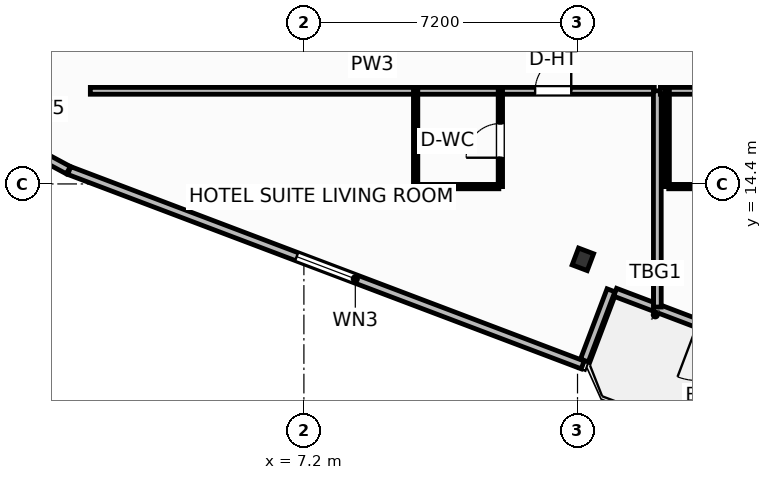
"""IFC4 building model, lengths in metres.
Left out: names, types, materials, properties, quantities, classifications, styles, units other than length and angle.
Written with IfcOpenShell. Run it as: python <this file> out.ifc"""

import sys

from ifc_helpers import new_model, si_unit, direction, frame, frame_2d, origin, origin_2d, place, context, subcontext, project, spatial, rectangle, i_section, extrude, element, fill, save


model = new_model("IFC4")
c1 = context("Model", 3, precision=1e-05, world=origin(), true_north=direction((0.0, 1.0)))
c2 = subcontext(c1, "Body", "Model", "MODEL_VIEW")
j1 = project(units=[si_unit("LENGTHUNIT", "METRE"), si_unit("PLANEANGLEUNIT", "RADIAN")], contexts=[c1])
p1 = place(None, origin())
s1 = spatial("IfcSite", under=j1, at=p1, CompositionType="ELEMENT")
p2 = place(p1, origin())
s2 = spatial("IfcBuilding", under=s1, at=p2, CompositionType="ELEMENT")
p3 = place(p2, frame((0.0, 0.0, 76.2)))
s3 = spatial("IfcBuildingStorey", under=s2, at=p3, CompositionType="ELEMENT", Elevation=76.2)
p4 = place(p3, frame((14.541, 12.416, 0.0), z_axis=(0.0, 0.0, 1.0), x_axis=(0.935221751401, -0.354062530786, 0.0)))
e1 = element("IfcColumn", 1, at=p4, inside=s3, PredefinedType="COLUMN", context=c2, shape_type="SweptSolid", body=[
    extrude(i_section(OverallWidth=0.424, OverallDepth=0.474, WebThickness=0.048, FlangeThickness=0.077, FilletRadius=0.025, at=origin_2d()), origin(), (0.0, 0.0, 1.0), 3.7),
])
p5 = place(p3, frame((21.0, 9.425, 0.0), z_axis=(0.0, 0.0, 1.0), x_axis=(-0.93521416643, 0.354082565101, 0.0)))
e2 = element("IfcWall", 2, at=p5, inside=s3, PredefinedType="SOLIDWALL", context=c2, shape_type="SweptSolid", body=[
    extrude(rectangle(XDim=6.0, YDim=0.22, at=frame_2d((3.0, 0.0))), origin(), (0.0, 0.0, 1.0), 2.73),
])
p6 = place(p5, frame((2.176, 0.0, 0.0)))
e3 = element("IfcOpeningElement", 3, at=p6, cuts=e2, PredefinedType="OPENING", context=c2, shape_type="SweptSolid", body=[
    extrude(rectangle(XDim=1.5, YDim=2.25, at=frame_2d((0.75, 1.125))), frame((0.0, 0.12, 0.0), z_axis=(0.0, -1.0, 0.0), x_axis=(1.0, 0.0, 0.0)), (0.0, 0.0, 1.0), 0.24),
])
p7 = place(p3, frame((-0.197, 15.406, 0.0), z_axis=(0.0, 0.0, 1.0), x_axis=(0.881023507585, -0.47307248819, 0.0)))
e4 = element("IfcWall", 4, at=p7, inside=s3, PredefinedType="SOLIDWALL", context=c2, shape_type="SweptSolid", body=[
    extrude(rectangle(XDim=1.361, YDim=0.22, at=frame_2d((0.68, 0.0))), origin(), (0.0, 0.0, 1.0), 2.73),
])
p8 = place(p3, frame((1.026, 14.753, 0.0), z_axis=(0.0, 0.0, 1.0), x_axis=(0.935222448475, -0.354060689526, 0.0)))
e5 = element("IfcWall", 5, at=p8, inside=s3, PredefinedType="SOLIDWALL", context=c2, shape_type="SweptSolid", body=[
    extrude(rectangle(XDim=14.447, YDim=0.22, at=frame_2d((7.224, 0.0))), origin(), (0.0, 0.0, 1.0), 2.73),
])
p9 = place(p8, frame((6.399, 0.0, 0.8)))
e6 = element("IfcOpeningElement", 6, at=p9, cuts=e5, PredefinedType="OPENING", context=c2, shape_type="SweptSolid", body=[
    extrude(rectangle(XDim=1.65, YDim=1.65, at=frame_2d((0.825, 0.825))), frame((0.0, 0.12, 0.0), z_axis=(0.0, -1.0, 0.0), x_axis=(1.0, 0.0, 0.0)), (0.0, 0.0, 1.0), 0.24),
])
p10 = place(p3, frame((14.581, 9.755, 0.0), z_axis=(0.0, 0.0, 1.0), x_axis=(0.354061611705, 0.935222099352, 0.0)))
e7 = element("IfcWall", 7, at=p10, inside=s3, PredefinedType="SOLIDWALL", context=c2, shape_type="SweptSolid", body=[
    extrude(rectangle(XDim=1.975, YDim=0.22, at=frame_2d((0.987, 0.0))), origin(), (0.0, 0.0, 1.0), 2.73),
])
p11 = place(p3, frame((1.58, 16.85, 0.0), z_axis=(0.0, 0.0, 1.0), x_axis=(1.0, 0.0, 0.0)))
e8 = element("IfcWall", 8, at=p11, inside=s3, PredefinedType="PARTITIONING", context=c2, shape_type="SweptSolid", body=[
    extrude(rectangle(XDim=14.84, YDim=0.18, at=frame_2d((7.42, 0.0))), origin(), (0.0, 0.0, 1.0), 3.45),
])
p12 = place(p11, frame((11.705, 0.0, 0.0)))
e9 = element("IfcOpeningElement", 9, at=p12, cuts=e8, PredefinedType="OPENING", context=c2, shape_type="SweptSolid", body=[
    extrude(rectangle(XDim=0.95, YDim=2.15, at=frame_2d((0.475, 1.075))), frame((0.0, 0.1, 0.0), z_axis=(0.0, -1.0, 0.0), x_axis=(1.0, 0.0, 0.0)), (0.0, 0.0, 1.0), 0.2),
])
p13 = place(p3, frame((10.18, 14.33, 0.0), z_axis=(0.0, 0.0, 1.0), x_axis=(1.0, 0.0, 0.0)))
e10 = element("IfcWall", 10, at=p13, inside=s3, PredefinedType="PARTITIONING", context=c2, shape_type="SweptSolid", body=[
    extrude(rectangle(XDim=2.15, YDim=0.115, at=frame_2d((1.075, 0.0))), origin(), (0.0, 0.0, 1.0), 3.45),
])
p14 = place(p3, frame((12.37, 14.33, 0.0), z_axis=(0.0, 0.0, 1.0), x_axis=(0.0, 1.0, 0.0)))
e11 = element("IfcWall", 11, at=p14, inside=s3, PredefinedType="PARTITIONING", context=c2, shape_type="SweptSolid", body=[
    extrude(rectangle(XDim=2.52, YDim=0.115, at=frame_2d((1.26, 0.0))), origin(), (0.0, 0.0, 1.0), 3.45),
])
p15 = place(p14, frame((0.76, 0.0, 0.0)))
e12 = element("IfcOpeningElement", 12, at=p15, cuts=e11, PredefinedType="OPENING", context=c2, shape_type="SweptSolid", body=[
    extrude(rectangle(XDim=0.9, YDim=2.05, at=frame_2d((0.45, 1.025))), frame((0.0, 0.067, 0.0), z_axis=(0.0, -1.0, 0.0), x_axis=(1.0, 0.0, 0.0)), (0.0, 0.0, 1.0), 0.135),
])
p16 = place(p3, frame((10.14, 14.33, 0.0), z_axis=(0.0, 0.0, 1.0), x_axis=(0.0, 1.0, 0.0)))
e13 = element("IfcWall", 13, at=p16, inside=s3, PredefinedType="PARTITIONING", context=c2, shape_type="SweptSolid", body=[
    extrude(rectangle(XDim=2.52, YDim=0.115, at=frame_2d((1.26, 0.0))), origin(), (0.0, 0.0, 1.0), 3.45),
])
p17 = place(p3, frame((16.5, 11.161, 0.0), z_axis=(0.0, 0.0, 1.0), x_axis=(0.0, 1.0, 0.0)))
e14 = element("IfcWall", 14, at=p17, inside=s3, PredefinedType="PARTITIONING", context=c2, shape_type="SweptSolid", body=[
    extrude(rectangle(XDim=5.689, YDim=0.205, at=frame_2d((2.844, 0.0))), origin(), (0.0, 0.0, 1.0), 3.45),
])
p18 = place(p3, frame((16.58, 16.85, 0.0), z_axis=(0.0, 0.0, 1.0), x_axis=(1.0, 0.0, 0.0)))
e15 = element("IfcWall", 15, at=p18, inside=s3, PredefinedType="PARTITIONING", context=c2, shape_type="SweptSolid", body=[
    extrude(rectangle(XDim=8.84, YDim=0.18, at=frame_2d((4.42, 0.0))), origin(), (0.0, 0.0, 1.0), 3.45),
])
p19 = place(p18, frame((3.23, 0.0, 0.0)))
e16 = element("IfcOpeningElement", 16, at=p19, cuts=e15, PredefinedType="OPENING", context=c2, shape_type="SweptSolid", body=[
    extrude(rectangle(XDim=0.95, YDim=2.15, at=frame_2d((0.475, 1.075))), frame((0.0, 0.1, 0.0), z_axis=(0.0, -1.0, 0.0), x_axis=(1.0, 0.0, 0.0)), (0.0, 0.0, 1.0), 0.2),
])
p20 = place(p3, frame((16.8, 14.33, 0.0), z_axis=(0.0, 0.0, 1.0), x_axis=(1.0, 0.0, 0.0)))
e17 = element("IfcWall", 17, at=p20, inside=s3, PredefinedType="PARTITIONING", context=c2, shape_type="SweptSolid", body=[
    extrude(rectangle(XDim=2.15, YDim=0.115, at=frame_2d((1.075, 0.0))), origin(), (0.0, 0.0, 1.0), 3.45),
])
p21 = place(p3, frame((16.76, 14.33, 0.0), z_axis=(0.0, 0.0, 1.0), x_axis=(0.0, 1.0, 0.0)))
e18 = element("IfcWall", 18, at=p21, inside=s3, PredefinedType="PARTITIONING", context=c2, shape_type="SweptSolid", body=[
    extrude(rectangle(XDim=2.52, YDim=0.115, at=frame_2d((1.26, 0.0))), origin(), (0.0, 0.0, 1.0), 3.45),
])
p22 = place(p9, origin())
e19 = element("IfcWindow", 19, at=p22, inside=s3, PartitioningType="SINGLE_PANEL", PredefinedType="WINDOW", context=c2, shape_type="SweptSolid", body=[
    extrude(rectangle(XDim=1.65, YDim=1.65, at=frame_2d((0.825, 0.825))), frame((0.0, 0.03, 0.0), z_axis=(0.0, -1.0, 0.0), x_axis=(1.0, 0.0, 0.0)), (0.0, 0.0, 1.0), 0.06),
])
fill(e6, e19)
p23 = place(p12, origin())
e20 = element("IfcDoor", 20, at=p23, inside=s3, OperationType="SINGLE_SWING_RIGHT", PredefinedType="DOOR", context=c2, shape_type="SweptSolid", body=[
    extrude(rectangle(XDim=0.95, YDim=2.15, at=frame_2d((0.475, 1.075))), frame((0.0, 0.025, 0.0), z_axis=(0.0, -1.0, 0.0), x_axis=(1.0, 0.0, 0.0)), (0.0, 0.0, 1.0), 0.05),
])
fill(e9, e20)
p24 = place(p15, origin())
e21 = element("IfcDoor", 21, at=p24, inside=s3, OperationType="SINGLE_SWING_LEFT", PredefinedType="DOOR", context=c2, shape_type="SweptSolid", body=[
    extrude(rectangle(XDim=0.9, YDim=2.05, at=frame_2d((0.45, 1.025))), frame((0.0, 0.025, 0.0), z_axis=(0.0, -1.0, 0.0), x_axis=(1.0, 0.0, 0.0)), (0.0, 0.0, 1.0), 0.05),
])
fill(e12, e21)
save(model, sys.argv[1])
